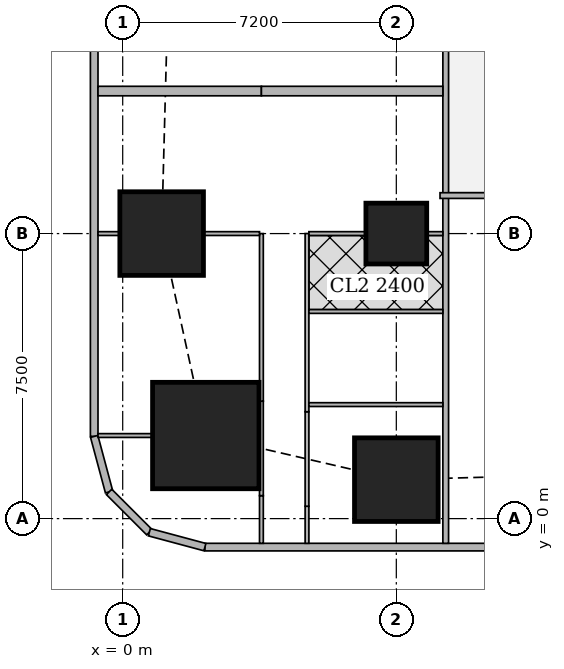
"""IFC4 building model, lengths in metres.
Left out: names, types, materials, properties, quantities, classifications, styles, units other than length and angle.
Written with IfcOpenShell. Run it as: python <this file> out.ifc"""

import sys

from ifc_helpers import new_model, si_unit, direction, frame, frame_2d, origin, origin_2d, place, context, subcontext, project, spatial, rectangle, extrude, element, fill, save


model = new_model("IFC4")
c1 = context("Model", 3, precision=1e-05, world=origin(), true_north=direction((0.0, 1.0)))
c2 = subcontext(c1, "Body", "Model", "MODEL_VIEW")
j1 = project(units=[si_unit("LENGTHUNIT", "METRE"), si_unit("PLANEANGLEUNIT", "RADIAN")], contexts=[c1])
p1 = place(None, origin())
s1 = spatial("IfcSite", under=j1, at=p1, CompositionType="ELEMENT")
p2 = place(p1, origin())
s2 = spatial("IfcBuilding", under=s1, at=p2, CompositionType="ELEMENT")
p3 = place(p2, frame((0.0, 0.0, 89.15)))
s3 = spatial("IfcBuildingStorey", under=s2, at=p3, CompositionType="ELEMENT", Elevation=89.15)
p4 = place(p3, frame((7.2, 1.025, 0.0), z_axis=(0.0, 0.0, 1.0), x_axis=(1.0, 0.0, 0.0)))
e1 = element("IfcColumn", 1, at=p4, inside=s3, PredefinedType="COLUMN", context=c2, shape_type="SweptSolid", body=[
    extrude(rectangle(XDim=2.2, YDim=2.2, at=origin_2d()), origin(), (0.0, 0.0, 1.0), 3.75),
])
p5 = place(p3, frame((2.186, 2.186, 0.0), z_axis=(0.0, 0.0, 1.0), x_axis=(1.0, 0.0, 0.0)))
e2 = element("IfcColumn", 2, at=p5, inside=s3, PredefinedType="COLUMN", context=c2, shape_type="SweptSolid", body=[
    extrude(rectangle(XDim=2.8, YDim=2.8, at=origin_2d()), origin(), (0.0, 0.0, 1.0), 3.75),
])
p6 = place(p3, frame((1.025, 7.5, 0.0), z_axis=(0.0, 0.0, 1.0), x_axis=(1.0, 0.0, 0.0)))
e3 = element("IfcColumn", 3, at=p6, inside=s3, PredefinedType="COLUMN", context=c2, shape_type="SweptSolid", body=[
    extrude(rectangle(XDim=2.2, YDim=2.2, at=origin_2d()), origin(), (0.0, 0.0, 1.0), 3.75),
])
p7 = place(p3, frame((7.2, 7.5, 0.0), z_axis=(0.0, 0.0, 1.0), x_axis=(1.0, 0.0, 0.0)))
e4 = element("IfcColumn", 4, at=p7, inside=s3, PredefinedType="COLUMN", context=c2, shape_type="SweptSolid", body=[
    extrude(rectangle(XDim=1.6, YDim=1.6, at=origin_2d()), origin(), (0.0, 0.0, 1.0), 3.75),
])
p8 = place(p3, frame((2.163, -0.75, 0.0), z_axis=(0.0, 0.0, 1.0), x_axis=(1.0, 0.0, 0.0)))
e5 = element("IfcWall", 5, at=p8, inside=s3, PredefinedType="SOLIDWALL", context=c2, shape_type="SweptSolid", body=[
    extrude(rectangle(XDim=45.628, YDim=0.2, at=frame_2d((22.814, 0.0))), origin(), (0.0, 0.0, 1.0), 3.5),
])
p9 = place(p8, frame((9.537, 0.0, 0.9)))
e6 = element("IfcOpeningElement", 6, at=p9, cuts=e5, PredefinedType="OPENING", context=c2, shape_type="SweptSolid", body=[
    extrude(rectangle(XDim=1.8, YDim=1.5, at=frame_2d((0.9, 0.75))), frame((0.0, 0.11, 0.0), z_axis=(0.0, -1.0, 0.0), x_axis=(1.0, 0.0, 0.0)), (0.0, 0.0, 1.0), 0.22),
])
p10 = place(p8, frame((13.137, 0.0, 0.9)))
e7 = element("IfcOpeningElement", 7, at=p10, cuts=e5, PredefinedType="OPENING", context=c2, shape_type="SweptSolid", body=[
    extrude(rectangle(XDim=1.8, YDim=1.5, at=frame_2d((0.9, 0.75))), frame((0.0, 0.11, 0.0), z_axis=(0.0, -1.0, 0.0), x_axis=(1.0, 0.0, 0.0)), (0.0, 0.0, 1.0), 0.22),
])
p11 = place(p8, frame((16.737, 0.0, 0.9)))
e8 = element("IfcOpeningElement", 8, at=p11, cuts=e5, PredefinedType="OPENING", context=c2, shape_type="SweptSolid", body=[
    extrude(rectangle(XDim=1.8, YDim=1.5, at=frame_2d((0.9, 0.75))), frame((0.0, 0.11, 0.0), z_axis=(0.0, -1.0, 0.0), x_axis=(1.0, 0.0, 0.0)), (0.0, 0.0, 1.0), 0.22),
])
p12 = place(p8, frame((20.337, 0.0, 0.9)))
e9 = element("IfcOpeningElement", 9, at=p12, cuts=e5, PredefinedType="OPENING", context=c2, shape_type="SweptSolid", body=[
    extrude(rectangle(XDim=1.8, YDim=1.5, at=frame_2d((0.9, 0.75))), frame((0.0, 0.11, 0.0), z_axis=(0.0, -1.0, 0.0), x_axis=(1.0, 0.0, 0.0)), (0.0, 0.0, 1.0), 0.22),
])
p13 = place(p8, frame((23.937, 0.0, 0.9)))
e10 = element("IfcOpeningElement", 10, at=p13, cuts=e5, PredefinedType="OPENING", context=c2, shape_type="SweptSolid", body=[
    extrude(rectangle(XDim=1.8, YDim=1.5, at=frame_2d((0.9, 0.75))), frame((0.0, 0.11, 0.0), z_axis=(0.0, -1.0, 0.0), x_axis=(1.0, 0.0, 0.0)), (0.0, 0.0, 1.0), 0.22),
])
p14 = place(p8, frame((27.537, 0.0, 0.9)))
e11 = element("IfcOpeningElement", 11, at=p14, cuts=e5, PredefinedType="OPENING", context=c2, shape_type="SweptSolid", body=[
    extrude(rectangle(XDim=1.8, YDim=1.5, at=frame_2d((0.9, 0.75))), frame((0.0, 0.11, 0.0), z_axis=(0.0, -1.0, 0.0), x_axis=(1.0, 0.0, 0.0)), (0.0, 0.0, 1.0), 0.22),
])
p15 = place(p8, frame((31.137, 0.0, 0.9)))
e12 = element("IfcOpeningElement", 12, at=p15, cuts=e5, PredefinedType="OPENING", context=c2, shape_type="SweptSolid", body=[
    extrude(rectangle(XDim=1.8, YDim=1.5, at=frame_2d((0.9, 0.75))), frame((0.0, 0.11, 0.0), z_axis=(0.0, -1.0, 0.0), x_axis=(1.0, 0.0, 0.0)), (0.0, 0.0, 1.0), 0.22),
])
p16 = place(p8, frame((34.737, 0.0, 0.9)))
e13 = element("IfcOpeningElement", 13, at=p16, cuts=e5, PredefinedType="OPENING", context=c2, shape_type="SweptSolid", body=[
    extrude(rectangle(XDim=1.8, YDim=1.5, at=frame_2d((0.9, 0.75))), frame((0.0, 0.11, 0.0), z_axis=(0.0, -1.0, 0.0), x_axis=(1.0, 0.0, 0.0)), (0.0, 0.0, 1.0), 0.22),
])
p17 = place(p3, frame((-0.75, 42.837, 0.0), z_axis=(0.0, 0.0, 1.0), x_axis=(0.0, -1.0, 0.0)))
e14 = element("IfcWall", 14, at=p17, inside=s3, PredefinedType="SOLIDWALL", context=c2, shape_type="SweptSolid", body=[
    extrude(rectangle(XDim=40.674, YDim=0.2, at=frame_2d((20.337, 0.0))), origin(), (0.0, 0.0, 1.0), 3.5),
])
p18 = place(p17, frame((1.78, 0.0, 0.9)))
e15 = element("IfcOpeningElement", 15, at=p18, cuts=e14, PredefinedType="OPENING", context=c2, shape_type="SweptSolid", body=[
    extrude(rectangle(XDim=1.8, YDim=1.5, at=frame_2d((0.9, 0.75))), frame((0.0, 0.11, 0.0), z_axis=(0.0, -1.0, 0.0), x_axis=(1.0, 0.0, 0.0)), (0.0, 0.0, 1.0), 0.22),
])
p19 = place(p17, frame((6.312, 0.0, 0.9)))
e16 = element("IfcOpeningElement", 16, at=p19, cuts=e14, PredefinedType="OPENING", context=c2, shape_type="SweptSolid", body=[
    extrude(rectangle(XDim=1.8, YDim=1.5, at=frame_2d((0.9, 0.75))), frame((0.0, 0.11, 0.0), z_axis=(0.0, -1.0, 0.0), x_axis=(1.0, 0.0, 0.0)), (0.0, 0.0, 1.0), 0.22),
])
p20 = place(p17, frame((10.062, 0.0, 0.9)))
e17 = element("IfcOpeningElement", 17, at=p20, cuts=e14, PredefinedType="OPENING", context=c2, shape_type="SweptSolid", body=[
    extrude(rectangle(XDim=1.8, YDim=1.5, at=frame_2d((0.9, 0.75))), frame((0.0, 0.11, 0.0), z_axis=(0.0, -1.0, 0.0), x_axis=(1.0, 0.0, 0.0)), (0.0, 0.0, 1.0), 0.22),
])
p21 = place(p17, frame((13.812, 0.0, 0.9)))
e18 = element("IfcOpeningElement", 18, at=p21, cuts=e14, PredefinedType="OPENING", context=c2, shape_type="SweptSolid", body=[
    extrude(rectangle(XDim=1.8, YDim=1.5, at=frame_2d((0.9, 0.75))), frame((0.0, 0.11, 0.0), z_axis=(0.0, -1.0, 0.0), x_axis=(1.0, 0.0, 0.0)), (0.0, 0.0, 1.0), 0.22),
])
p22 = place(p17, frame((17.562, 0.0, 0.9)))
e19 = element("IfcOpeningElement", 19, at=p22, cuts=e14, PredefinedType="OPENING", context=c2, shape_type="SweptSolid", body=[
    extrude(rectangle(XDim=1.8, YDim=1.5, at=frame_2d((0.9, 0.75))), frame((0.0, 0.11, 0.0), z_axis=(0.0, -1.0, 0.0), x_axis=(1.0, 0.0, 0.0)), (0.0, 0.0, 1.0), 0.22),
])
p23 = place(p17, frame((21.312, 0.0, 0.9)))
e20 = element("IfcOpeningElement", 20, at=p23, cuts=e14, PredefinedType="OPENING", context=c2, shape_type="SweptSolid", body=[
    extrude(rectangle(XDim=1.8, YDim=1.5, at=frame_2d((0.9, 0.75))), frame((0.0, 0.11, 0.0), z_axis=(0.0, -1.0, 0.0), x_axis=(1.0, 0.0, 0.0)), (0.0, 0.0, 1.0), 0.22),
])
p24 = place(p17, frame((25.062, 0.0, 0.9)))
e21 = element("IfcOpeningElement", 21, at=p24, cuts=e14, PredefinedType="OPENING", context=c2, shape_type="SweptSolid", body=[
    extrude(rectangle(XDim=1.8, YDim=1.5, at=frame_2d((0.9, 0.75))), frame((0.0, 0.11, 0.0), z_axis=(0.0, -1.0, 0.0), x_axis=(1.0, 0.0, 0.0)), (0.0, 0.0, 1.0), 0.22),
])
p25 = place(p17, frame((28.812, 0.0, 0.9)))
e22 = element("IfcOpeningElement", 22, at=p25, cuts=e14, PredefinedType="OPENING", context=c2, shape_type="SweptSolid", body=[
    extrude(rectangle(XDim=1.8, YDim=1.5, at=frame_2d((0.9, 0.75))), frame((0.0, 0.11, 0.0), z_axis=(0.0, -1.0, 0.0), x_axis=(1.0, 0.0, 0.0)), (0.0, 0.0, 1.0), 0.22),
])
p26 = place(p17, frame((32.562, 0.0, 0.9)))
e23 = element("IfcOpeningElement", 23, at=p26, cuts=e14, PredefinedType="OPENING", context=c2, shape_type="SweptSolid", body=[
    extrude(rectangle(XDim=1.8, YDim=1.5, at=frame_2d((0.9, 0.75))), frame((0.0, 0.11, 0.0), z_axis=(0.0, -1.0, 0.0), x_axis=(1.0, 0.0, 0.0)), (0.0, 0.0, 1.0), 0.22),
])
p27 = place(p17, frame((37.094, 0.0, 0.9)))
e24 = element("IfcOpeningElement", 24, at=p27, cuts=e14, PredefinedType="OPENING", context=c2, shape_type="SweptSolid", body=[
    extrude(rectangle(XDim=1.8, YDim=1.5, at=frame_2d((0.9, 0.75))), frame((0.0, 0.11, 0.0), z_axis=(0.0, -1.0, 0.0), x_axis=(1.0, 0.0, 0.0)), (0.0, 0.0, 1.0), 0.22),
])
p28 = place(p3, frame((-0.75, 2.163, 0.0), z_axis=(0.0, 0.0, 1.0), x_axis=(0.259168954497, -0.965832000415, 0.0)))
e25 = element("IfcWall", 25, at=p28, inside=s3, PredefinedType="SOLIDWALL", context=c2, shape_type="SweptSolid", body=[
    extrude(rectangle(XDim=1.513, YDim=0.2, at=frame_2d((0.756, 0.0))), origin(), (0.0, 0.0, 1.0), 3.5),
])
p29 = place(p3, frame((-0.358, 0.702, 0.0), z_axis=(0.0, 0.0, 1.0), x_axis=(0.707106781187, -0.707106781187, 0.0)))
e26 = element("IfcWall", 26, at=p29, inside=s3, PredefinedType="SOLIDWALL", context=c2, shape_type="SweptSolid", body=[
    extrude(rectangle(XDim=1.499, YDim=0.2, at=frame_2d((0.75, 0.0))), origin(), (0.0, 0.0, 1.0), 3.5),
])
p30 = place(p3, frame((0.702, -0.358, 0.0), z_axis=(0.0, 0.0, 1.0), x_axis=(0.965832000415, -0.259168954497, 0.0)))
e27 = element("IfcWall", 27, at=p30, inside=s3, PredefinedType="SOLIDWALL", context=c2, shape_type="SweptSolid", body=[
    extrude(rectangle(XDim=1.513, YDim=0.2, at=frame_2d((0.756, 0.0))), origin(), (0.0, 0.0, 1.0), 3.5),
])
p31 = place(p3, frame((8.5, -0.65, 0.0), z_axis=(0.0, 0.0, 1.0), x_axis=(0.0, 1.0, 0.0)))
e28 = element("IfcWall", 28, at=p31, inside=s3, PredefinedType="SOLIDWALL", context=c2, shape_type="SweptSolid", body=[
    extrude(rectangle(XDim=46.3, YDim=0.15, at=frame_2d((23.15, 0.0))), origin(), (0.0, 0.0, 1.0), 2.2),
])
p32 = place(p31, frame((9.525, 0.0, 0.0)))
e29 = element("IfcOpeningElement", 29, at=p32, cuts=e28, PredefinedType="OPENING", context=c2, shape_type="SweptSolid", body=[
    extrude(rectangle(XDim=1.0, YDim=2.1, at=frame_2d((0.5, 1.05))), frame((0.0, 0.085, 0.0), z_axis=(0.0, -1.0, 0.0), x_axis=(1.0, 0.0, 0.0)), (0.0, 0.0, 1.0), 0.17),
])
p33 = place(p31, frame((13.275, 0.0, 0.0)))
e30 = element("IfcOpeningElement", 30, at=p33, cuts=e28, PredefinedType="OPENING", context=c2, shape_type="SweptSolid", body=[
    extrude(rectangle(XDim=1.0, YDim=2.1, at=frame_2d((0.5, 1.05))), frame((0.0, 0.085, 0.0), z_axis=(0.0, -1.0, 0.0), x_axis=(1.0, 0.0, 0.0)), (0.0, 0.0, 1.0), 0.17),
])
p34 = place(p31, frame((20.775, 0.0, 0.0)))
e31 = element("IfcOpeningElement", 31, at=p34, cuts=e28, PredefinedType="OPENING", context=c2, shape_type="SweptSolid", body=[
    extrude(rectangle(XDim=1.0, YDim=2.1, at=frame_2d((0.5, 1.05))), frame((0.0, 0.085, 0.0), z_axis=(0.0, -1.0, 0.0), x_axis=(1.0, 0.0, 0.0)), (0.0, 0.0, 1.0), 0.17),
])
p35 = place(p31, frame((32.025, 0.0, 0.0)))
e32 = element("IfcOpeningElement", 32, at=p35, cuts=e28, PredefinedType="OPENING", context=c2, shape_type="SweptSolid", body=[
    extrude(rectangle(XDim=1.0, YDim=2.1, at=frame_2d((0.5, 1.05))), frame((0.0, 0.085, 0.0), z_axis=(0.0, -1.0, 0.0), x_axis=(1.0, 0.0, 0.0)), (0.0, 0.0, 1.0), 0.17),
])
p36 = place(p3, frame((40.053, 8.5, 0.0), z_axis=(0.0, 0.0, 1.0), x_axis=(-1.0, 0.0, 0.0)))
e33 = element("IfcWall", 33, at=p36, inside=s3, PredefinedType="SOLIDWALL", context=c2, shape_type="SweptSolid", body=[
    extrude(rectangle(XDim=31.703, YDim=0.15, at=frame_2d((15.852, 0.0))), origin(), (0.0, 0.0, 1.0), 3.5),
])
p37 = place(p36, frame((28.103, 0.0, 0.0)))
e34 = element("IfcOpeningElement", 34, at=p37, cuts=e33, PredefinedType="OPENING", context=c2, shape_type="SweptSolid", body=[
    extrude(rectangle(XDim=1.0, YDim=2.1, at=frame_2d((0.5, 1.05))), frame((0.0, 0.085, 0.0), z_axis=(0.0, -1.0, 0.0), x_axis=(1.0, 0.0, 0.0)), (0.0, 0.0, 1.0), 0.17),
])
p38 = place(p36, frame((19.953, 0.0, 0.0)))
e35 = element("IfcOpeningElement", 35, at=p38, cuts=e33, PredefinedType="OPENING", context=c2, shape_type="SweptSolid", body=[
    extrude(rectangle(XDim=1.0, YDim=2.1, at=frame_2d((0.5, 1.05))), frame((0.0, 0.085, 0.0), z_axis=(0.0, -1.0, 0.0), x_axis=(1.0, 0.0, 0.0)), (0.0, 0.0, 1.0), 0.17),
])
p39 = place(p36, frame((12.753, 0.0, 0.0)))
e36 = element("IfcOpeningElement", 36, at=p39, cuts=e33, PredefinedType="OPENING", context=c2, shape_type="SweptSolid", body=[
    extrude(rectangle(XDim=1.0, YDim=2.1, at=frame_2d((0.5, 1.05))), frame((0.0, 0.085, 0.0), z_axis=(0.0, -1.0, 0.0), x_axis=(1.0, 0.0, 0.0)), (0.0, 0.0, 1.0), 0.17),
])
p40 = place(p36, frame((0.15, 0.0, 0.0)))
e37 = element("IfcOpeningElement", 37, at=p40, cuts=e33, PredefinedType="OPENING", context=c2, shape_type="SweptSolid", body=[
    extrude(rectangle(XDim=1.0, YDim=2.1, at=frame_2d((0.5, 1.05))), frame((0.0, 0.085, 0.0), z_axis=(0.0, -1.0, 0.0), x_axis=(1.0, 0.0, 0.0)), (0.0, 0.0, 1.0), 0.17),
])
p41 = place(p3, frame((3.65, -0.65, 0.0), z_axis=(0.0, 0.0, 1.0), x_axis=(0.0, 1.0, 0.0)))
e38 = element("IfcWall", 38, at=p41, inside=s3, PredefinedType="PARTITIONING", context=c2, shape_type="SweptSolid", body=[
    extrude(rectangle(XDim=1.254, YDim=0.1, at=frame_2d((0.627, 0.0))), origin(), (0.0, 0.0, 1.0), 3.5),
])
p42 = place(p3, frame((3.65, 0.604, 0.0), z_axis=(0.0, 0.0, 1.0), x_axis=(0.0, 1.0, 0.0)))
e39 = element("IfcWall", 39, at=p42, inside=s3, PredefinedType="PARTITIONING", context=c2, shape_type="SweptSolid", body=[
    extrude(rectangle(XDim=2.486, YDim=0.1, at=frame_2d((1.243, 0.0))), origin(), (0.0, 0.0, 1.0), 2.05),
])
p43 = place(p3, frame((3.65, 3.09, 0.0), z_axis=(0.0, 0.0, 1.0), x_axis=(0.0, 1.0, 0.0)))
e40 = element("IfcWall", 40, at=p43, inside=s3, PredefinedType="PARTITIONING", context=c2, shape_type="SweptSolid", body=[
    extrude(rectangle(XDim=4.41, YDim=0.1, at=frame_2d((2.205, 0.0))), origin(), (0.0, 0.0, 1.0), 3.5),
])
p44 = place(p43, frame((3.31, 0.0, 0.0)))
e41 = element("IfcOpeningElement", 41, at=p44, cuts=e40, PredefinedType="OPENING", context=c2, shape_type="SweptSolid", body=[
    extrude(rectangle(XDim=0.9, YDim=2.1, at=frame_2d((0.45, 1.05))), frame((0.0, 0.06, 0.0), z_axis=(0.0, -1.0, 0.0), x_axis=(1.0, 0.0, 0.0)), (0.0, 0.0, 1.0), 0.12),
])
p45 = place(p3, frame((4.85, -0.65, 0.0), z_axis=(0.0, 0.0, 1.0), x_axis=(0.0, 1.0, 0.0)))
e42 = element("IfcWall", 42, at=p45, inside=s3, PredefinedType="PARTITIONING", context=c2, shape_type="SweptSolid", body=[
    extrude(rectangle(XDim=0.976, YDim=0.1, at=frame_2d((0.488, 0.0))), origin(), (0.0, 0.0, 1.0), 3.5),
])
p46 = place(p3, frame((4.85, 0.326, 0.0), z_axis=(0.0, 0.0, 1.0), x_axis=(0.0, 1.0, 0.0)))
e43 = element("IfcWall", 43, at=p46, inside=s3, PredefinedType="PARTITIONING", context=c2, shape_type="SweptSolid", body=[
    extrude(rectangle(XDim=2.486, YDim=0.1, at=frame_2d((1.243, 0.0))), origin(), (0.0, 0.0, 1.0), 2.05),
])
p47 = place(p3, frame((4.85, 2.812, 0.0), z_axis=(0.0, 0.0, 1.0), x_axis=(0.0, 1.0, 0.0)))
e44 = element("IfcWall", 44, at=p47, inside=s3, PredefinedType="PARTITIONING", context=c2, shape_type="SweptSolid", body=[
    extrude(rectangle(XDim=4.688, YDim=0.1, at=frame_2d((2.344, 0.0))), origin(), (0.0, 0.0, 1.0), 3.5),
])
p48 = place(p47, frame((3.213, 0.0, 0.0)))
e45 = element("IfcOpeningElement", 45, at=p48, cuts=e44, PredefinedType="OPENING", context=c2, shape_type="SweptSolid", body=[
    extrude(rectangle(XDim=0.9, YDim=2.1, at=frame_2d((0.45, 1.05))), frame((0.0, 0.06, 0.0), z_axis=(0.0, -1.0, 0.0), x_axis=(1.0, 0.0, 0.0)), (0.0, 0.0, 1.0), 0.12),
])
p49 = place(p47, frame((1.338, 0.0, 0.0)))
e46 = element("IfcOpeningElement", 46, at=p49, cuts=e44, PredefinedType="OPENING", context=c2, shape_type="SweptSolid", body=[
    extrude(rectangle(XDim=0.9, YDim=2.1, at=frame_2d((0.45, 1.05))), frame((0.0, 0.06, 0.0), z_axis=(0.0, -1.0, 0.0), x_axis=(1.0, 0.0, 0.0)), (0.0, 0.0, 1.0), 0.12),
])
p50 = place(p3, frame((-0.65, 2.186, 0.0), z_axis=(0.0, 0.0, 1.0), x_axis=(1.0, 0.0, 0.0)))
e47 = element("IfcWall", 47, at=p50, inside=s3, PredefinedType="PARTITIONING", context=c2, shape_type="SweptSolid", body=[
    extrude(rectangle(XDim=1.435, YDim=0.1, at=frame_2d((0.717, 0.0))), origin(), (0.0, 0.0, 1.0), 3.5),
])
p51 = place(p3, frame((-0.65, 7.5, 0.0), z_axis=(0.0, 0.0, 1.0), x_axis=(1.0, 0.0, 0.0)))
e48 = element("IfcWall", 48, at=p51, inside=s3, PredefinedType="PARTITIONING", context=c2, shape_type="SweptSolid", body=[
    extrude(rectangle(XDim=0.574, YDim=0.1, at=frame_2d((0.287, 0.0))), origin(), (0.0, 0.0, 1.0), 2.05),
])
p52 = place(p3, frame((2.126, 7.5, 0.0), z_axis=(0.0, 0.0, 1.0), x_axis=(1.0, 0.0, 0.0)))
e49 = element("IfcWall", 49, at=p52, inside=s3, PredefinedType="PARTITIONING", context=c2, shape_type="SweptSolid", body=[
    extrude(rectangle(XDim=1.474, YDim=0.1, at=frame_2d((0.737, 0.0))), origin(), (0.0, 0.0, 1.0), 2.05),
])
p53 = place(p3, frame((4.9, 7.5, 0.0), z_axis=(0.0, 0.0, 1.0), x_axis=(1.0, 0.0, 0.0)))
e50 = element("IfcWall", 50, at=p53, inside=s3, PredefinedType="PARTITIONING", context=c2, shape_type="SweptSolid", body=[
    extrude(rectangle(XDim=1.499, YDim=0.1, at=frame_2d((0.75, 0.0))), origin(), (0.0, 0.0, 1.0), 3.5),
])
p54 = place(p3, frame((8.001, 7.5, 0.0), z_axis=(0.0, 0.0, 1.0), x_axis=(1.0, 0.0, 0.0)))
e51 = element("IfcWall", 51, at=p54, inside=s3, PredefinedType="PARTITIONING", context=c2, shape_type="SweptSolid", body=[
    extrude(rectangle(XDim=0.424, YDim=0.1, at=frame_2d((0.212, 0.0))), origin(), (0.0, 0.0, 1.0), 3.5),
])
p55 = place(p3, frame((4.9, 5.45, 0.0), z_axis=(0.0, 0.0, 1.0), x_axis=(1.0, 0.0, 0.0)))
e52 = element("IfcWall", 52, at=p55, inside=s3, PredefinedType="PARTITIONING", context=c2, shape_type="SweptSolid", body=[
    extrude(rectangle(XDim=3.525, YDim=0.1, at=frame_2d((1.763, 0.0))), origin(), (0.0, 0.0, 1.0), 3.5),
])
p56 = place(p3, frame((-0.65, 11.25, 0.0), z_axis=(0.0, 0.0, 1.0), x_axis=(1.0, 0.0, 0.0)))
e53 = element("IfcWall", 53, at=p56, inside=s3, PredefinedType="SOLIDWALL", context=c2, shape_type="SweptSolid", body=[
    extrude(rectangle(XDim=4.3, YDim=0.25, at=frame_2d((2.15, 0.0))), origin(), (0.0, 0.0, 1.0), 2.2),
])
p57 = place(p3, frame((3.65, 11.25, 0.0), z_axis=(0.0, 0.0, 1.0), x_axis=(1.0, 0.0, 0.0)))
e54 = element("IfcWall", 54, at=p57, inside=s3, PredefinedType="SOLIDWALL", context=c2, shape_type="SweptSolid", body=[
    extrude(rectangle(XDim=4.775, YDim=0.25, at=frame_2d((2.388, 0.0))), origin(), (0.0, 0.0, 1.0), 3.5),
])
p58 = place(p3, frame((8.425, 3.0, 0.0), z_axis=(0.0, 0.0, 1.0), x_axis=(-1.0, 0.0, 0.0)))
e55 = element("IfcWall", 55, at=p58, inside=s3, PredefinedType="PARTITIONING", context=c2, shape_type="SweptSolid", body=[
    extrude(rectangle(XDim=3.525, YDim=0.1, at=frame_2d((1.763, 0.0))), origin(), (0.0, 0.0, 1.0), 3.5),
])
p59 = place(p58, frame((2.35, 0.0, 0.0)))
e56 = element("IfcOpeningElement", 56, at=p59, cuts=e55, PredefinedType="OPENING", context=c2, shape_type="SweptSolid", body=[
    extrude(rectangle(XDim=0.9, YDim=2.1, at=frame_2d((0.45, 1.05))), frame((0.0, 0.06, 0.0), z_axis=(0.0, -1.0, 0.0), x_axis=(1.0, 0.0, 0.0)), (0.0, 0.0, 1.0), 0.12),
])
p60 = place(p25, origin())
e57 = element("IfcWindow", 57, at=p60, inside=s3, PartitioningType="SINGLE_PANEL", PredefinedType="WINDOW", context=c2, shape_type="SweptSolid", body=[
    extrude(rectangle(XDim=1.8, YDim=1.5, at=frame_2d((0.9, 0.75))), frame((0.0, 0.03, 0.0), z_axis=(0.0, -1.0, 0.0), x_axis=(1.0, 0.0, 0.0)), (0.0, 0.0, 1.0), 0.06),
])
fill(e22, e57)
p61 = place(p26, origin())
e58 = element("IfcWindow", 58, at=p61, inside=s3, PartitioningType="SINGLE_PANEL", PredefinedType="WINDOW", context=c2, shape_type="SweptSolid", body=[
    extrude(rectangle(XDim=1.8, YDim=1.5, at=frame_2d((0.9, 0.75))), frame((0.0, 0.03, 0.0), z_axis=(0.0, -1.0, 0.0), x_axis=(1.0, 0.0, 0.0)), (0.0, 0.0, 1.0), 0.06),
])
fill(e23, e58)
p62 = place(p27, origin())
e59 = element("IfcWindow", 59, at=p62, inside=s3, PartitioningType="SINGLE_PANEL", PredefinedType="WINDOW", context=c2, shape_type="SweptSolid", body=[
    extrude(rectangle(XDim=1.8, YDim=1.5, at=frame_2d((0.9, 0.75))), frame((0.0, 0.03, 0.0), z_axis=(0.0, -1.0, 0.0), x_axis=(1.0, 0.0, 0.0)), (0.0, 0.0, 1.0), 0.06),
])
fill(e24, e59)
p63 = place(p44, origin())
e60 = element("IfcDoor", 60, at=p63, inside=s3, OperationType="SINGLE_SWING_RIGHT", PredefinedType="DOOR", context=c2, shape_type="SweptSolid", body=[
    extrude(rectangle(XDim=0.9, YDim=2.1, at=frame_2d((0.45, 1.05))), frame((0.0, 0.025, 0.0), z_axis=(0.0, -1.0, 0.0), x_axis=(1.0, 0.0, 0.0)), (0.0, 0.0, 1.0), 0.05),
])
fill(e41, e60)
p64 = place(p48, origin())
e61 = element("IfcDoor", 61, at=p64, inside=s3, OperationType="SINGLE_SWING_LEFT", PredefinedType="DOOR", context=c2, shape_type="SweptSolid", body=[
    extrude(rectangle(XDim=0.9, YDim=2.1, at=frame_2d((0.45, 1.05))), frame((0.0, 0.025, 0.0), z_axis=(0.0, -1.0, 0.0), x_axis=(1.0, 0.0, 0.0)), (0.0, 0.0, 1.0), 0.05),
])
fill(e45, e61)
p65 = place(p49, origin())
e62 = element("IfcDoor", 62, at=p65, inside=s3, OperationType="SINGLE_SWING_LEFT", PredefinedType="DOOR", context=c2, shape_type="SweptSolid", body=[
    extrude(rectangle(XDim=0.9, YDim=2.1, at=frame_2d((0.45, 1.05))), frame((0.0, 0.025, 0.0), z_axis=(0.0, -1.0, 0.0), x_axis=(1.0, 0.0, 0.0)), (0.0, 0.0, 1.0), 0.05),
])
fill(e46, e62)
p66 = place(p32, origin())
e63 = element("IfcDoor", 63, at=p66, inside=s3, OperationType="SINGLE_SWING_LEFT", PredefinedType="DOOR", context=c2, shape_type="SweptSolid", body=[
    extrude(rectangle(XDim=1.0, YDim=2.1, at=frame_2d((0.5, 1.05))), frame((0.0, 0.025, 0.0), z_axis=(0.0, -1.0, 0.0), x_axis=(1.0, 0.0, 0.0)), (0.0, 0.0, 1.0), 0.05),
])
fill(e29, e63)
p67 = place(p59, origin())
e64 = element("IfcDoor", 64, at=p67, inside=s3, OperationType="SINGLE_SWING_RIGHT", PredefinedType="DOOR", context=c2, shape_type="SweptSolid", body=[
    extrude(rectangle(XDim=0.9, YDim=2.1, at=frame_2d((0.45, 1.05))), frame((0.0, 0.025, 0.0), z_axis=(0.0, -1.0, 0.0), x_axis=(1.0, 0.0, 0.0)), (0.0, 0.0, 1.0), 0.05),
])
fill(e56, e64)
save(model, sys.argv[1])
